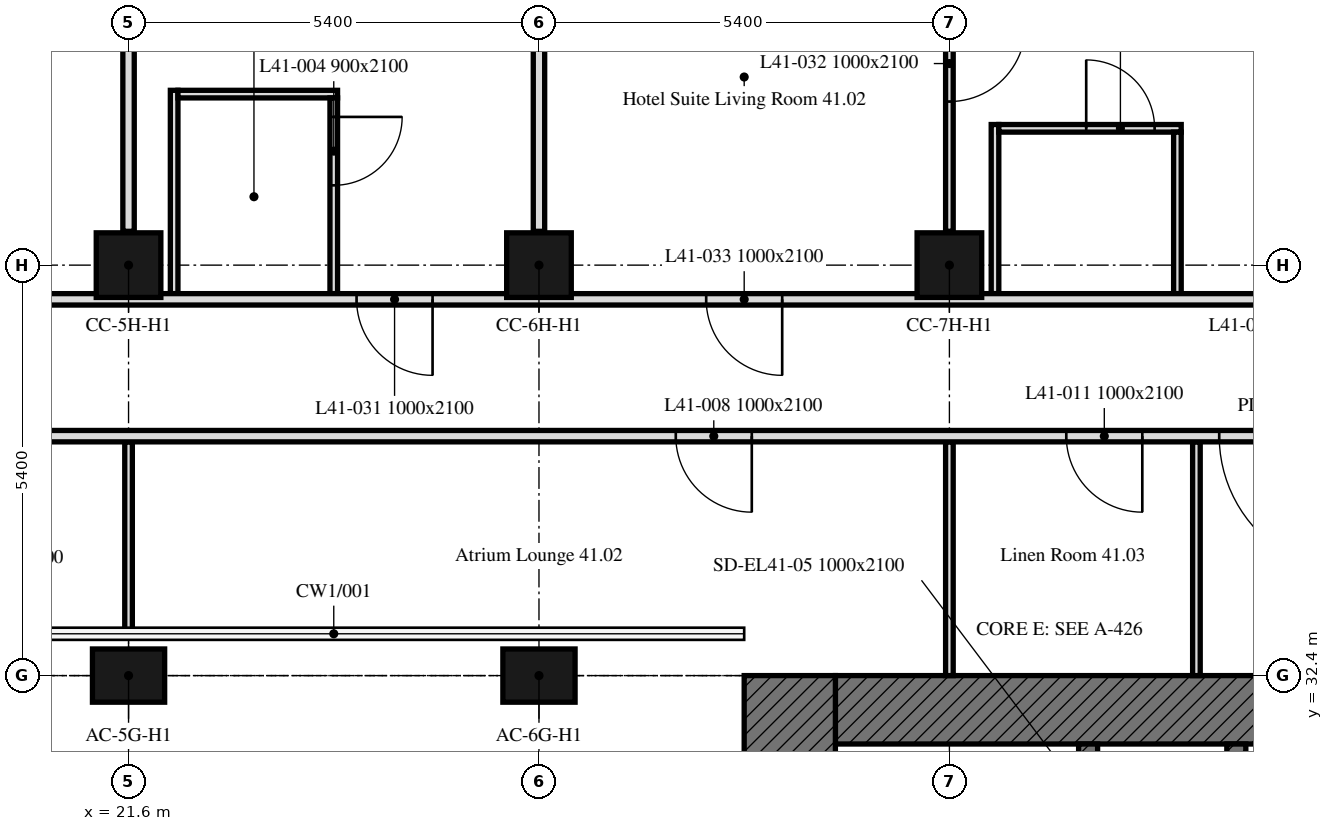
"""IFC4 building model, lengths in metres.
Left out: names, types, materials, properties, quantities, classifications, styles, units other than length and angle.
Written with IfcOpenShell. Run it as: python <this file> out.ifc"""

import sys

from ifc_helpers import new_model, si_unit, direction, frame, frame_2d, origin, origin_2d, place, context, subcontext, project, spatial, rectangle, extrude, element, fill, save


model = new_model("IFC4")
c1 = context("Model", 3, precision=1e-05, world=origin(), true_north=direction((0.0, 1.0)))
c2 = subcontext(c1, "Body", "Model", "MODEL_VIEW")
j1 = project(units=[si_unit("LENGTHUNIT", "METRE"), si_unit("PLANEANGLEUNIT", "RADIAN")], contexts=[c1])
p1 = place(None, origin())
s1 = spatial("IfcSite", under=j1, at=p1, CompositionType="ELEMENT")
p2 = place(p1, origin())
s2 = spatial("IfcBuilding", under=s1, at=p2, CompositionType="ELEMENT")
p3 = place(p2, frame((0.0, 0.0, 172.6)))
s3 = spatial("IfcBuildingStorey", under=s2, at=p3, CompositionType="ELEMENT", Elevation=172.6)
for number, where, z_axis, x_axis in (
    (1, (21.6, 32.4, 0.0), (0.0, 0.0, 1.0), (1.0, 0.0, 0.0)),
    (2, (27.0, 32.4, 0.0), (0.0, 0.0, 1.0), (1.0, 0.0, 0.0)),
):
    element("IfcColumn", number, at=place(p3, frame(where, z_axis=z_axis, x_axis=x_axis)), inside=s3, PredefinedType="COLUMN", context=c2, shape_type="SweptSolid", body=[
        extrude(rectangle(XDim=0.95, YDim=0.7, at=origin_2d()), origin(), (0.0, 0.0, 1.0), 2.8),
    ])
for number, where, z_axis, x_axis in (
    (3, (21.6, 37.8, 0.0), (0.0, 0.0, 1.0), (1.0, 0.0, 0.0)),
    (4, (27.0, 37.8, 0.0), (0.0, 0.0, 1.0), (1.0, 0.0, 0.0)),
    (5, (32.4, 37.8, 0.0), (0.0, 0.0, 1.0), (1.0, 0.0, 0.0)),
):
    element("IfcColumn", number, at=place(p3, frame(where, z_axis=z_axis, x_axis=x_axis)), inside=s3, PredefinedType="COLUMN", context=c2, shape_type="SweptSolid", body=[
        extrude(rectangle(XDim=0.85, YDim=0.85, at=origin_2d()), origin(), (0.0, 0.0, 1.0), 2.8),
    ])
p4 = place(p3, frame((30.9, 31.95, 0.0), z_axis=(0.0, 0.0, 1.0), x_axis=(1.0, 0.0, 0.0)))
e6 = element("IfcWall", 6, at=p4, inside=s3, PredefinedType="SOLIDWALL", context=c2, shape_type="SweptSolid", body=[
    extrude(rectangle(XDim=11.1, YDim=0.9, at=frame_2d((5.55, 0.0))), origin(), (0.0, 0.0, 1.0), 2.8),
])
p5 = place(p4, frame((5.55, 0.0, 0.0)))
e7 = element("IfcOpeningElement", 7, at=p5, cuts=e6, PredefinedType="OPENING", context=c2, shape_type="SweptSolid", body=[
    extrude(rectangle(XDim=2.0, YDim=2.4, at=frame_2d((1.0, 1.2))), frame((0.0, 0.45, 0.0), z_axis=(0.0, -1.0, 0.0), x_axis=(1.0, 0.0, 0.0)), (0.0, 0.0, 1.0), 0.9),
])
p6 = place(p3, frame((30.3, 16.2, 0.0), z_axis=(0.0, 0.0, 1.0), x_axis=(0.0, 1.0, 0.0)))
e8 = element("IfcWall", 8, at=p6, inside=s3, PredefinedType="SOLIDWALL", context=c2, shape_type="SweptSolid", body=[
    extrude(rectangle(XDim=16.2, YDim=1.2, at=frame_2d((8.1, 0.0))), origin(), (0.0, 0.0, 1.0), 2.8),
])
p7 = place(p3, frame((34.225, 17.1, 0.0), z_axis=(0.0, 0.0, 1.0), x_axis=(0.0, 1.0, 0.0)))
e9 = element("IfcWall", 9, at=p7, inside=s3, PredefinedType="SOLIDWALL", context=c2, shape_type="SweptSolid", body=[
    extrude(rectangle(XDim=14.4, YDim=0.25, at=frame_2d((7.2, 0.0))), origin(), (0.0, 0.0, 1.0), 2.8),
])
p8 = place(p7, frame((13.15, 0.0, 0.0)))
e10 = element("IfcOpeningElement", 10, at=p8, cuts=e9, PredefinedType="OPENING", context=c2, shape_type="SweptSolid", body=[
    extrude(rectangle(XDim=1.0, YDim=2.1, at=frame_2d((0.5, 1.05))), frame((0.0, 0.125, 0.0), z_axis=(0.0, -1.0, 0.0), x_axis=(1.0, 0.0, 0.0)), (0.0, 0.0, 1.0), 0.25),
])
p9 = place(p7, frame((0.6, 0.0, 0.0)))
e11 = element("IfcOpeningElement", 11, at=p9, cuts=e9, PredefinedType="OPENING", context=c2, shape_type="SweptSolid", body=[
    extrude(rectangle(XDim=1.1, YDim=2.1, at=frame_2d((0.55, 1.05))), frame((0.0, 0.125, 0.0), z_axis=(0.0, -1.0, 0.0), x_axis=(1.0, 0.0, 0.0)), (0.0, 0.0, 1.0), 0.25),
])
p10 = place(p7, frame((3.25, 0.0, 0.0)))
e12 = element("IfcOpeningElement", 12, at=p10, cuts=e9, PredefinedType="OPENING", context=c2, shape_type="SweptSolid", body=[
    extrude(rectangle(XDim=0.9, YDim=2.1, at=frame_2d((0.45, 1.05))), frame((0.0, 0.125, 0.0), z_axis=(0.0, -1.0, 0.0), x_axis=(1.0, 0.0, 0.0)), (0.0, 0.0, 1.0), 0.25),
])
p11 = place(p3, frame((36.175, 29.4, 0.0), z_axis=(0.0, 0.0, 1.0), x_axis=(0.0, 1.0, 0.0)))
e13 = element("IfcWall", 13, at=p11, inside=s3, PredefinedType="SOLIDWALL", context=c2, shape_type="SweptSolid", body=[
    extrude(rectangle(XDim=2.1, YDim=0.25, at=frame_2d((1.05, 0.0))), origin(), (0.0, 0.0, 1.0), 2.8),
])
p12 = place(p11, frame((0.5, 0.0, 0.0)))
e14 = element("IfcOpeningElement", 14, at=p12, cuts=e13, PredefinedType="OPENING", context=c2, shape_type="SweptSolid", body=[
    extrude(rectangle(XDim=1.0, YDim=2.1, at=frame_2d((0.5, 1.05))), frame((0.0, 0.125, 0.0), z_axis=(0.0, -1.0, 0.0), x_axis=(1.0, 0.0, 0.0)), (0.0, 0.0, 1.0), 0.25),
])
p13 = place(p3, frame((21.6, 38.245, 0.0), z_axis=(0.0, 0.0, 1.0), x_axis=(0.0, 1.0, 0.0)))
e15 = element("IfcWall", 15, at=p13, inside=s3, PredefinedType="PARTITIONING", context=c2, shape_type="SweptSolid", body=[
    extrude(rectangle(XDim=4.204, YDim=0.15, at=frame_2d((2.102, 0.0))), origin(), (0.0, 0.0, 1.0), 2.8),
])
p14 = place(p3, frame((22.2, 37.425, 0.0), z_axis=(0.0, 0.0, 1.0), x_axis=(0.0, 1.0, 0.0)))
e16 = element("IfcWall", 16, at=p14, inside=s3, PredefinedType="PARTITIONING", context=c2, shape_type="SweptSolid", body=[
    extrude(rectangle(XDim=2.675, YDim=0.1, at=frame_2d((1.337, 0.0))), origin(), (0.0, 0.0, 1.0), 2.8),
])
p15 = place(p3, frame((22.25, 40.05, 0.0), z_axis=(0.0, 0.0, 1.0), x_axis=(1.0, 0.0, 0.0)))
e17 = element("IfcWall", 17, at=p15, inside=s3, PredefinedType="PARTITIONING", context=c2, shape_type="SweptSolid", body=[
    extrude(rectangle(XDim=2.1, YDim=0.1, at=frame_2d((1.05, 0.0))), origin(), (0.0, 0.0, 1.0), 2.8),
])
p16 = place(p3, frame((24.3, 40.0, 0.0), z_axis=(0.0, 0.0, 1.0), x_axis=(0.0, -1.0, 0.0)))
e18 = element("IfcWall", 18, at=p16, inside=s3, PredefinedType="PARTITIONING", context=c2, shape_type="SweptSolid", body=[
    extrude(rectangle(XDim=2.575, YDim=0.1, at=frame_2d((1.288, 0.0))), origin(), (0.0, 0.0, 1.0), 2.8),
])
p17 = place(p16, frame((0.25, 0.0, 0.0)))
e19 = element("IfcOpeningElement", 19, at=p17, cuts=e18, PredefinedType="OPENING", context=c2, shape_type="SweptSolid", body=[
    extrude(rectangle(XDim=0.9, YDim=2.1, at=frame_2d((0.45, 1.05))), frame((0.0, 0.05, 0.0), z_axis=(0.0, -1.0, 0.0), x_axis=(1.0, 0.0, 0.0)), (0.0, 0.0, 1.0), 0.1),
])
p18 = place(p3, frame((27.0, 38.245, 0.0), z_axis=(0.0, 0.0, 1.0), x_axis=(0.0, 1.0, 0.0)))
e20 = element("IfcWall", 20, at=p18, inside=s3, PredefinedType="PARTITIONING", context=c2, shape_type="SweptSolid", body=[
    extrude(rectangle(XDim=4.204, YDim=0.15, at=frame_2d((2.102, 0.0))), origin(), (0.0, 0.0, 1.0), 2.8),
])
p19 = place(p3, frame((32.4, 42.449, 0.0), z_axis=(0.0, 0.0, 1.0), x_axis=(0.0, -1.0, 0.0)))
e21 = element("IfcWall", 21, at=p19, inside=s3, PredefinedType="PARTITIONING", context=c2, shape_type="SweptSolid", body=[
    extrude(rectangle(XDim=4.204, YDim=0.1, at=frame_2d((2.102, 0.0))), origin(), (0.0, 0.0, 1.0), 2.8),
])
p20 = place(p19, frame((1.497, 0.0, 0.0)))
e22 = element("IfcOpeningElement", 22, at=p20, cuts=e21, PredefinedType="OPENING", context=c2, shape_type="SweptSolid", body=[
    extrude(rectangle(XDim=1.0, YDim=2.1, at=frame_2d((0.5, 1.05))), frame((0.0, 0.05, 0.0), z_axis=(0.0, -1.0, 0.0), x_axis=(1.0, 0.0, 0.0)), (0.0, 0.0, 1.0), 0.1),
])
p21 = place(p3, frame((33.0, 37.425, 0.0), z_axis=(0.0, 0.0, 1.0), x_axis=(0.0, 1.0, 0.0)))
e23 = element("IfcWall", 23, at=p21, inside=s3, PredefinedType="PARTITIONING", context=c2, shape_type="SweptSolid", body=[
    extrude(rectangle(XDim=2.225, YDim=0.1, at=frame_2d((1.112, 0.0))), origin(), (0.0, 0.0, 1.0), 2.8),
])
p22 = place(p3, frame((33.05, 39.6, 0.0), z_axis=(0.0, 0.0, 1.0), x_axis=(1.0, 0.0, 0.0)))
e24 = element("IfcWall", 24, at=p22, inside=s3, PredefinedType="PARTITIONING", context=c2, shape_type="SweptSolid", body=[
    extrude(rectangle(XDim=2.4, YDim=0.1, at=frame_2d((1.2, 0.0))), origin(), (0.0, 0.0, 1.0), 2.8),
])
p23 = place(p22, frame((1.15, 0.0, 0.0)))
e25 = element("IfcOpeningElement", 25, at=p23, cuts=e24, PredefinedType="OPENING", context=c2, shape_type="SweptSolid", body=[
    extrude(rectangle(XDim=0.9, YDim=2.1, at=frame_2d((0.45, 1.05))), frame((0.0, 0.05, 0.0), z_axis=(0.0, -1.0, 0.0), x_axis=(1.0, 0.0, 0.0)), (0.0, 0.0, 1.0), 0.1),
])
p24 = place(p3, frame((35.4, 39.55, 0.0), z_axis=(0.0, 0.0, 1.0), x_axis=(0.0, -1.0, 0.0)))
e26 = element("IfcWall", 26, at=p24, inside=s3, PredefinedType="PARTITIONING", context=c2, shape_type="SweptSolid", body=[
    extrude(rectangle(XDim=2.125, YDim=0.1, at=frame_2d((1.062, 0.0))), origin(), (0.0, 0.0, 1.0), 2.8),
])
p25 = place(p3, frame((47.849, 37.35, 0.0), z_axis=(0.0, 0.0, 1.0), x_axis=(-1.0, 0.0, 0.0)))
e27 = element("IfcWall", 27, at=p25, inside=s3, PredefinedType="PARTITIONING", context=c2, shape_type="SweptSolid", body=[
    extrude(rectangle(XDim=41.698, YDim=0.15, at=frame_2d((20.849, 0.0))), origin(), (0.0, 0.0, 1.0), 2.8),
])
p26 = place(p25, frame((39.249, 0.0, 0.0)))
e28 = element("IfcOpeningElement", 28, at=p26, cuts=e27, PredefinedType="OPENING", context=c2, shape_type="SweptSolid", body=[
    extrude(rectangle(XDim=1.0, YDim=2.1, at=frame_2d((0.5, 1.05))), frame((0.0, 0.075, 0.0), z_axis=(0.0, -1.0, 0.0), x_axis=(1.0, 0.0, 0.0)), (0.0, 0.0, 1.0), 0.15),
])
p27 = place(p25, frame((27.649, 0.0, 0.0)))
e29 = element("IfcOpeningElement", 29, at=p27, cuts=e27, PredefinedType="OPENING", context=c2, shape_type="SweptSolid", body=[
    extrude(rectangle(XDim=1.0, YDim=2.1, at=frame_2d((0.5, 1.05))), frame((0.0, 0.075, 0.0), z_axis=(0.0, -1.0, 0.0), x_axis=(1.0, 0.0, 0.0)), (0.0, 0.0, 1.0), 0.15),
])
p28 = place(p25, frame((22.249, 0.0, 0.0)))
e30 = element("IfcOpeningElement", 30, at=p28, cuts=e27, PredefinedType="OPENING", context=c2, shape_type="SweptSolid", body=[
    extrude(rectangle(XDim=1.0, YDim=2.1, at=frame_2d((0.5, 1.05))), frame((0.0, 0.075, 0.0), z_axis=(0.0, -1.0, 0.0), x_axis=(1.0, 0.0, 0.0)), (0.0, 0.0, 1.0), 0.15),
])
p29 = place(p25, frame((17.649, 0.0, 0.0)))
e31 = element("IfcOpeningElement", 31, at=p29, cuts=e27, PredefinedType="OPENING", context=c2, shape_type="SweptSolid", body=[
    extrude(rectangle(XDim=1.0, YDim=2.1, at=frame_2d((0.5, 1.05))), frame((0.0, 0.075, 0.0), z_axis=(0.0, -1.0, 0.0), x_axis=(1.0, 0.0, 0.0)), (0.0, 0.0, 1.0), 0.15),
])
p30 = place(p25, frame((2.744, 0.0, 0.0)))
e32 = element("IfcOpeningElement", 32, at=p30, cuts=e27, PredefinedType="OPENING", context=c2, shape_type="SweptSolid", body=[
    extrude(rectangle(XDim=1.0, YDim=2.1, at=frame_2d((0.5, 1.05))), frame((0.0, 0.075, 0.0), z_axis=(0.0, -1.0, 0.0), x_axis=(1.0, 0.0, 0.0)), (0.0, 0.0, 1.0), 0.15),
])
p31 = place(p3, frame((21.6, 32.895, 0.0), z_axis=(0.0, 0.0, 1.0), x_axis=(0.0, 1.0, 0.0)))
e33 = element("IfcWall", 33, at=p31, inside=s3, PredefinedType="PARTITIONING", context=c2, shape_type="SweptSolid", body=[
    extrude(rectangle(XDim=2.58, YDim=0.1, at=frame_2d((1.29, 0.0))), origin(), (0.0, 0.0, 1.0), 2.8),
])
for number, where, z_axis, x_axis in (
    (34, (32.4, 32.4, 0.0), (0.0, 0.0, 1.0), (0.0, 1.0, 0.0)),
    (35, (35.65, 35.475, 0.0), (0.0, 0.0, 1.0), (0.0, -1.0, 0.0)),
):
    element("IfcWall", number, at=place(p3, frame(where, z_axis=z_axis, x_axis=x_axis)), inside=s3, PredefinedType="PARTITIONING", context=c2, shape_type="SweptSolid", body=[
        extrude(rectangle(XDim=3.075, YDim=0.1, at=frame_2d((1.538, 0.0))), origin(), (0.0, 0.0, 1.0), 2.8),
    ])
p32 = place(p3, frame((43.275, 35.55, 0.0), z_axis=(0.0, 0.0, 1.0), x_axis=(-1.0, 0.0, 0.0)))
e36 = element("IfcWall", 36, at=p32, inside=s3, PredefinedType="PARTITIONING", context=c2, shape_type="SweptSolid", body=[
    extrude(rectangle(XDim=33.825, YDim=0.15, at=frame_2d((16.913, 0.0))), origin(), (0.0, 0.0, 1.0), 2.8),
])
p33 = place(p32, frame((23.875, 0.0, 0.0)))
e37 = element("IfcOpeningElement", 37, at=p33, cuts=e36, PredefinedType="OPENING", context=c2, shape_type="SweptSolid", body=[
    extrude(rectangle(XDim=1.0, YDim=2.1, at=frame_2d((0.5, 1.05))), frame((0.0, 0.075, 0.0), z_axis=(0.0, -1.0, 0.0), x_axis=(1.0, 0.0, 0.0)), (0.0, 0.0, 1.0), 0.15),
])
p34 = place(p32, frame((13.475, 0.0, 0.0)))
e38 = element("IfcOpeningElement", 38, at=p34, cuts=e36, PredefinedType="OPENING", context=c2, shape_type="SweptSolid", body=[
    extrude(rectangle(XDim=1.0, YDim=2.1, at=frame_2d((0.5, 1.05))), frame((0.0, 0.075, 0.0), z_axis=(0.0, -1.0, 0.0), x_axis=(1.0, 0.0, 0.0)), (0.0, 0.0, 1.0), 0.15),
])
p35 = place(p32, frame((8.337, 0.0, 0.0)))
e39 = element("IfcOpeningElement", 39, at=p35, cuts=e36, PredefinedType="OPENING", context=c2, shape_type="SweptSolid", body=[
    extrude(rectangle(XDim=1.0, YDim=2.1, at=frame_2d((0.5, 1.05))), frame((0.0, 0.075, 0.0), z_axis=(0.0, -1.0, 0.0), x_axis=(1.0, 0.0, 0.0)), (0.0, 0.0, 1.0), 0.15),
])
p36 = place(p32, frame((1.648, 0.0, 0.0)))
e40 = element("IfcOpeningElement", 40, at=p36, cuts=e36, PredefinedType="OPENING", context=c2, shape_type="SweptSolid", body=[
    extrude(rectangle(XDim=1.0, YDim=2.1, at=frame_2d((0.5, 1.05))), frame((0.0, 0.075, 0.0), z_axis=(0.0, -1.0, 0.0), x_axis=(1.0, 0.0, 0.0)), (0.0, 0.0, 1.0), 0.15),
])
p37 = place(p32, frame((28.613, 0.0, 0.0)))
e41 = element("IfcOpeningElement", 41, at=p37, cuts=e36, PredefinedType="OPENING", context=c2, shape_type="SweptSolid", body=[
    extrude(rectangle(XDim=1.0, YDim=2.1, at=frame_2d((0.5, 1.05))), frame((0.0, 0.075, 0.0), z_axis=(0.0, -1.0, 0.0), x_axis=(1.0, 0.0, 0.0)), (0.0, 0.0, 1.0), 0.15),
])
p38 = place(p32, frame((30.625, 0.0, 0.0)))
e42 = element("IfcOpeningElement", 42, at=p38, cuts=e36, PredefinedType="OPENING", context=c2, shape_type="SweptSolid", body=[
    extrude(rectangle(XDim=1.8, YDim=2.4, at=frame_2d((0.9, 1.2))), frame((0.0, 0.075, 0.0), z_axis=(0.0, -1.0, 0.0), x_axis=(1.0, 0.0, 0.0)), (0.0, 0.0, 1.0), 0.15),
])
p39 = place(p32, frame((5.525, 0.0, 0.0)))
e43 = element("IfcOpeningElement", 43, at=p39, cuts=e36, PredefinedType="OPENING", context=c2, shape_type="SweptSolid", body=[
    extrude(rectangle(XDim=1.8, YDim=2.4, at=frame_2d((0.9, 1.2))), frame((0.0, 0.075, 0.0), z_axis=(0.0, -1.0, 0.0), x_axis=(1.0, 0.0, 0.0)), (0.0, 0.0, 1.0), 0.15),
])
p40 = place(p17, origin())
e44 = element("IfcDoor", 44, at=p40, inside=s3, OperationType="SINGLE_SWING_RIGHT", PredefinedType="DOOR", context=c2, shape_type="SweptSolid", body=[
    extrude(rectangle(XDim=0.9, YDim=2.1, at=frame_2d((0.45, 1.05))), frame((0.0, 0.025, 0.0), z_axis=(0.0, -1.0, 0.0), x_axis=(1.0, 0.0, 0.0)), (0.0, 0.0, 1.0), 0.05),
])
fill(e19, e44)
p41 = place(p23, origin())
e45 = element("IfcDoor", 45, at=p41, inside=s3, OperationType="SINGLE_SWING_RIGHT", PredefinedType="DOOR", context=c2, shape_type="SweptSolid", body=[
    extrude(rectangle(XDim=0.9, YDim=2.1, at=frame_2d((0.45, 1.05))), frame((0.0, 0.025, 0.0), z_axis=(0.0, -1.0, 0.0), x_axis=(1.0, 0.0, 0.0)), (0.0, 0.0, 1.0), 0.05),
])
fill(e25, e45)
p42 = place(p34, origin())
e46 = element("IfcDoor", 46, at=p42, inside=s3, OperationType="SINGLE_SWING_RIGHT", PredefinedType="DOOR", context=c2, shape_type="SweptSolid", body=[
    extrude(rectangle(XDim=1.0, YDim=2.1, at=frame_2d((0.5, 1.05))), frame((0.0, 0.025, 0.0), z_axis=(0.0, -1.0, 0.0), x_axis=(1.0, 0.0, 0.0)), (0.0, 0.0, 1.0), 0.05),
])
fill(e38, e46)
p43 = place(p35, origin())
e47 = element("IfcDoor", 47, at=p43, inside=s3, OperationType="SINGLE_SWING_LEFT", PredefinedType="DOOR", context=c2, shape_type="SweptSolid", body=[
    extrude(rectangle(XDim=1.0, YDim=2.1, at=frame_2d((0.5, 1.05))), frame((0.0, 0.025, 0.0), z_axis=(0.0, -1.0, 0.0), x_axis=(1.0, 0.0, 0.0)), (0.0, 0.0, 1.0), 0.05),
])
fill(e39, e47)
p44 = place(p28, origin())
e48 = element("IfcDoor", 48, at=p44, inside=s3, OperationType="SINGLE_SWING_RIGHT", PredefinedType="DOOR", context=c2, shape_type="SweptSolid", body=[
    extrude(rectangle(XDim=1.0, YDim=2.1, at=frame_2d((0.5, 1.05))), frame((0.0, 0.025, 0.0), z_axis=(0.0, -1.0, 0.0), x_axis=(1.0, 0.0, 0.0)), (0.0, 0.0, 1.0), 0.05),
])
fill(e30, e48)
p45 = place(p20, origin())
e49 = element("IfcDoor", 49, at=p45, inside=s3, OperationType="SINGLE_SWING_RIGHT", PredefinedType="DOOR", context=c2, shape_type="SweptSolid", body=[
    extrude(rectangle(XDim=1.0, YDim=2.1, at=frame_2d((0.5, 1.05))), frame((0.0, 0.025, 0.0), z_axis=(0.0, -1.0, 0.0), x_axis=(1.0, 0.0, 0.0)), (0.0, 0.0, 1.0), 0.05),
])
fill(e22, e49)
p46 = place(p29, origin())
e50 = element("IfcDoor", 50, at=p46, inside=s3, OperationType="SINGLE_SWING_RIGHT", PredefinedType="DOOR", context=c2, shape_type="SweptSolid", body=[
    extrude(rectangle(XDim=1.0, YDim=2.1, at=frame_2d((0.5, 1.05))), frame((0.0, 0.025, 0.0), z_axis=(0.0, -1.0, 0.0), x_axis=(1.0, 0.0, 0.0)), (0.0, 0.0, 1.0), 0.05),
])
fill(e31, e50)
p47 = place(p39, origin())
e51 = element("IfcDoor", 51, at=p47, inside=s3, OperationType="DOUBLE_DOOR_SINGLE_SWING", PredefinedType="DOOR", context=c2, shape_type="SweptSolid", body=[
    extrude(rectangle(XDim=1.8, YDim=2.4, at=frame_2d((0.9, 1.2))), frame((0.0, 0.025, 0.0), z_axis=(0.0, -1.0, 0.0), x_axis=(1.0, 0.0, 0.0)), (0.0, 0.0, 1.0), 0.05),
])
fill(e43, e51)
save(model, sys.argv[1])
